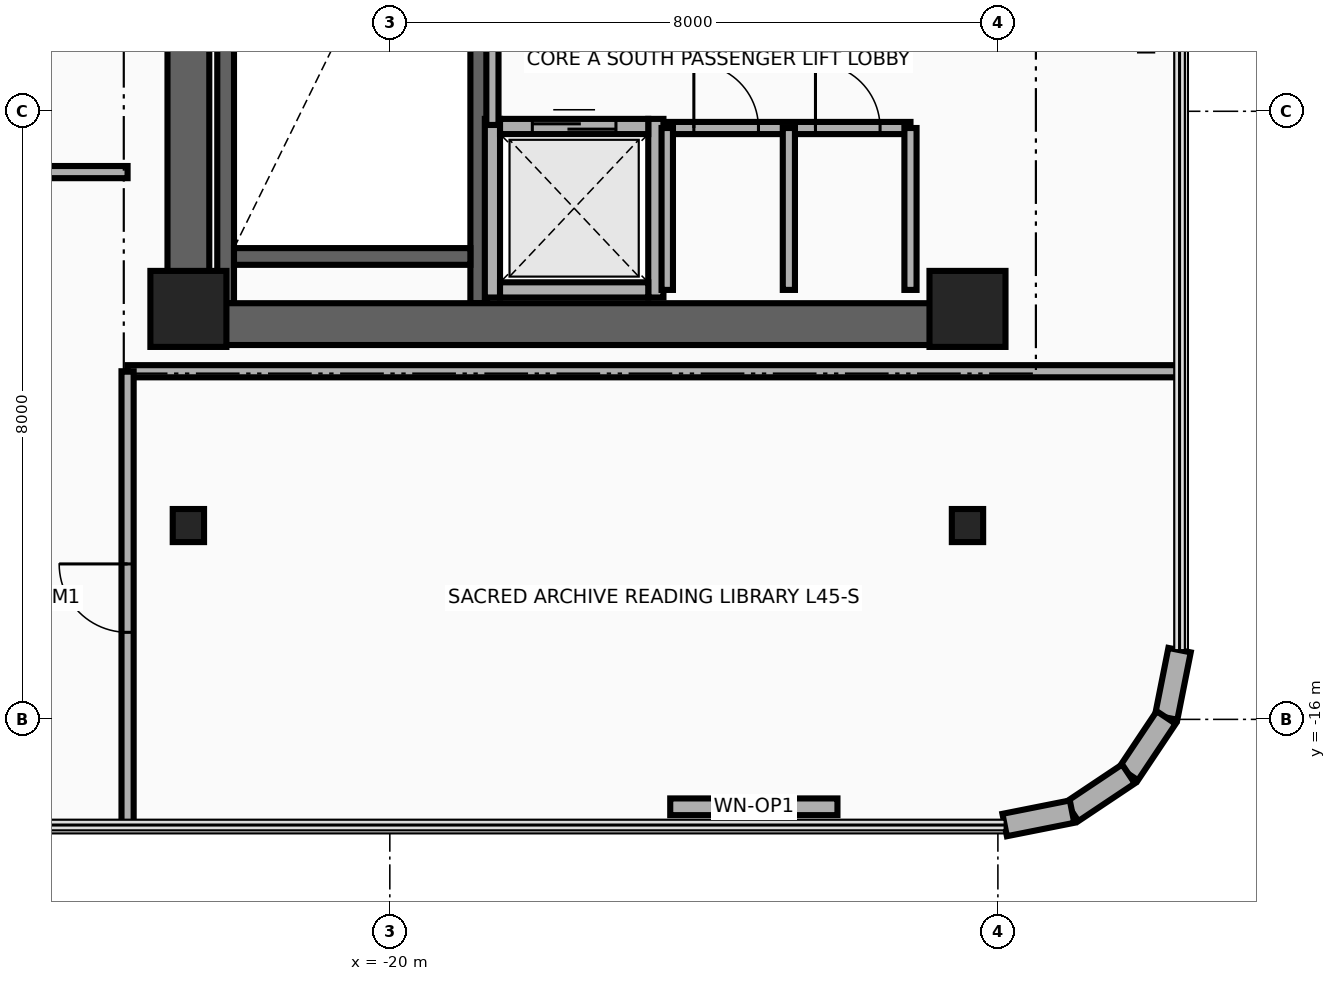
"""IFC4 building model, lengths in metres.
Left out: names, types, materials, properties, quantities, classifications, styles, units other than length and angle.
Written with IfcOpenShell. Run it as: python <this file> out.ifc"""

import sys

from ifc_helpers import new_model, si_unit, direction, frame, frame_2d, origin, origin_2d, place, context, subcontext, project, spatial, rectangle, i_section, extrude, source, transform, mapped, element, fill, save


model = new_model("IFC4")
c1 = context("Model", 3, precision=1e-05, world=origin(), true_north=direction((0.0, 1.0)))
c2 = subcontext(c1, "Body", "Model", "MODEL_VIEW")
j1 = project(units=[si_unit("LENGTHUNIT", "METRE"), si_unit("PLANEANGLEUNIT", "RADIAN")], contexts=[c1])
p1 = place(None, origin())
s1 = spatial("IfcSite", under=j1, at=p1, CompositionType="ELEMENT")
p2 = place(p1, origin())
s2 = spatial("IfcBuilding", under=s1, at=p2, CompositionType="ELEMENT")
p3 = place(p2, frame((0.0, 0.0, 176.55)))
s3 = spatial("IfcBuildingStorey", under=s2, at=p3, CompositionType="ELEMENT", Elevation=176.55)
for number, where, z_axis, x_axis in (
    (1, (-22.16, -10.525, 0.0), (0.0, 0.0, 1.0), (0.0, 1.0, 0.0)),
    (2, (-18.83, -10.525, 0.0), (0.0, 0.0, 1.0), (0.0, 1.0, 0.0)),
):
    element("IfcWall", number, at=place(p3, frame(where, z_axis=z_axis, x_axis=x_axis)), inside=s3, PredefinedType="SHEAR", context=c2, shape_type="SweptSolid", body=[
        extrude(rectangle(XDim=8.745, YDim=0.22, at=frame_2d((4.373, 0.0))), origin(), (0.0, 0.0, 1.0), 3.63),
    ])
p4 = place(p3, frame((-22.05, -9.91, 0.0), z_axis=(0.0, 0.0, 1.0), x_axis=(1.0, 0.0, 0.0)))
e3 = element("IfcWall", 3, at=p4, inside=s3, PredefinedType="SHEAR", context=c2, shape_type="SweptSolid", body=[
    extrude(rectangle(XDim=3.11, YDim=0.22, at=frame_2d((1.555, 0.0))), origin(), (0.0, 0.0, 1.0), 3.63),
])
p5 = place(p3, frame((-22.65, -11.075, 0.0), z_axis=(0.0, 0.0, 1.0), x_axis=(0.0, 1.0, 0.0)))
e4 = element("IfcWall", 4, at=p5, inside=s3, PredefinedType="SHEAR", context=c2, shape_type="SweptSolid", body=[
    extrude(rectangle(XDim=22.15, YDim=0.55, at=frame_2d((11.075, 0.0))), origin(), (0.0, 0.0, 1.0), 3.63),
])
p6 = place(p3, frame((-22.65, -10.8, 0.0), z_axis=(0.0, 0.0, 1.0), x_axis=(1.0, 0.0, 0.0)))
e5 = element("IfcWall", 5, at=p6, inside=s3, PredefinedType="SHEAR", context=c2, shape_type="SweptSolid", body=[
    extrude(rectangle(XDim=10.25, YDim=0.55, at=frame_2d((5.125, 0.0))), origin(), (0.0, 0.0, 1.0), 3.63),
])
m1 = source(origin(), c2, "Body", "SweptSolid", [
    extrude(rectangle(XDim=1.0, YDim=1.0, at=origin_2d()), origin(), (0.0, 0.0, 1.0), 3.95),
])
for number, where, z_axis, x_axis in (
    (6, (-22.65, -10.6, 0.0), (0.0, 0.0, 1.0), (1.0, 0.0, 0.0)),
    (7, (-12.4, -10.6, 0.0), (0.0, 0.0, 1.0), (1.0, 0.0, 0.0)),
):
    element("IfcColumn", number, at=place(p3, frame(where, z_axis=z_axis, x_axis=x_axis)), inside=s3, PredefinedType="COLUMN", context=c2, shape_type="MappedRepresentation", body=[
        mapped(m1, transform((0.0, 0.0, 0.0), x_axis=(1.0, 0.0, 0.0), y_axis=(0.0, 1.0, 0.0), z_axis=(0.0, 0.0, 1.0), scale=1.0)),
    ])
m2 = source(origin(), c2, "Body", "SweptSolid", [
    extrude(i_section(OverallWidth=0.412, OverallDepth=0.435, WebThickness=0.036, FlangeThickness=0.057, at=origin_2d()), origin(), (0.0, 0.0, 1.0), 3.95),
])
for number, where, z_axis, x_axis in (
    (8, (-22.65, -13.45, 0.0), (0.0, 0.0, 1.0), (1.0, 0.0, 0.0)),
    (9, (-12.4, -13.45, 0.0), (0.0, 0.0, 1.0), (1.0, 0.0, 0.0)),
):
    element("IfcColumn", number, at=place(p3, frame(where, z_axis=z_axis, x_axis=x_axis)), inside=s3, PredefinedType="COLUMN", context=c2, shape_type="MappedRepresentation", body=[
        mapped(m2, transform((0.0, 0.0, 0.0), x_axis=(1.0, 0.0, 0.0), y_axis=(0.0, 1.0, 0.0), z_axis=(0.0, 0.0, 1.0), scale=1.0)),
    ])
p7 = place(p3, frame((-9.61, -15.089, 0.0), z_axis=(0.0, 0.0, 1.0), x_axis=(-0.195025152871, -0.980798241101, 0.0)))
e10 = element("IfcWall", 10, at=p7, inside=s3, PredefinedType="SOLIDWALL", context=c2, shape_type="SweptSolid", body=[
    extrude(rectangle(XDim=0.904, YDim=0.3, at=frame_2d((0.452, 0.0))), origin(), (0.0, 0.0, 1.0), 3.63),
])
for number, where, z_axis, x_axis in (
    (11, (-9.786, -15.976, 0.0), (0.0, 0.0, 1.0), (-0.556, -0.832, 0.0)),
    (12, (-10.282, -16.718, 0.0), (0.0, 0.0, 1.0), (-0.832, -0.556, 0.0)),
):
    element("IfcWall", number, at=place(p3, frame(where, z_axis=z_axis, x_axis=x_axis)), inside=s3, PredefinedType="SOLIDWALL", context=c2, shape_type="SweptSolid", body=[
        extrude(rectangle(XDim=0.893, YDim=0.3, at=frame_2d((0.446, 0.0))), origin(), (0.0, 0.0, 1.0), 3.63),
    ])
p8 = place(p3, frame((-11.024, -17.214, 0.0), z_axis=(0.0, 0.0, 1.0), x_axis=(-0.980798241101, -0.195025152871, 0.0)))
e13 = element("IfcWall", 13, at=p8, inside=s3, PredefinedType="SOLIDWALL", context=c2, shape_type="SweptSolid", body=[
    extrude(rectangle(XDim=0.904, YDim=0.3, at=frame_2d((0.452, 0.0))), origin(), (0.0, 0.0, 1.0), 3.63),
])
p9 = place(p3, frame((-14.111, -17.15, 0.0), z_axis=(0.0, 0.0, 1.0), x_axis=(-1.0, 0.0, 0.0)))
e14 = element("IfcWall", 14, at=p9, inside=s3, PredefinedType="SOLIDWALL", context=c2, shape_type="SweptSolid", body=[
    extrude(rectangle(XDim=2.2, YDim=0.22, at=frame_2d((1.1, 0.0))), origin(), (0.0, 0.0, 1.0), 3.63),
])
p10 = place(p9, frame((0.65, 0.0, 0.95)))
e15 = element("IfcOpeningElement", 15, at=p10, cuts=e14, PredefinedType="OPENING", context=c2, shape_type="SweptSolid", body=[
    extrude(rectangle(XDim=0.9, YDim=1.3, at=frame_2d((0.45, 0.65))), frame((0.0, 0.125, 0.0), z_axis=(0.0, -1.0, 0.0), x_axis=(1.0, 0.0, 0.0)), (0.0, 0.0, 1.0), 0.25),
])
for number, where, z_axis, x_axis in (
    (16, (-18.65, -10.45, 0.0), (0.0, 0.0, 1.0), (0.0, 1.0, 0.0)),
    (17, (-16.5, -10.45, 0.0), (0.0, 0.0, 1.0), (0.0, 1.0, 0.0)),
):
    element("IfcWall", number, at=place(p3, frame(where, z_axis=z_axis, x_axis=x_axis)), inside=s3, PredefinedType="MOVABLE", context=c2, shape_type="SweptSolid", body=[
        extrude(rectangle(XDim=2.35, YDim=0.2, at=frame_2d((1.175, 0.0))), origin(), (0.0, 0.0, 1.0), 2.665),
    ])
p11 = place(p3, frame((-18.55, -10.35, 0.0), z_axis=(0.0, 0.0, 1.0), x_axis=(1.0, 0.0, 0.0)))
e18 = element("IfcWall", 18, at=p11, inside=s3, PredefinedType="MOVABLE", context=c2, shape_type="SweptSolid", body=[
    extrude(rectangle(XDim=1.95, YDim=0.2, at=frame_2d((0.975, 0.0))), origin(), (0.0, 0.0, 1.0), 2.665),
])
p12 = place(p3, frame((-18.55, -8.2, 0.0), z_axis=(0.0, 0.0, 1.0), x_axis=(1.0, 0.0, 0.0)))
e19 = element("IfcWall", 19, at=p12, inside=s3, PredefinedType="MOVABLE", context=c2, shape_type="SweptSolid", body=[
    extrude(rectangle(XDim=1.95, YDim=0.2, at=frame_2d((0.975, 0.0))), origin(), (0.0, 0.0, 1.0), 3.63),
])
p13 = place(p12, frame((0.425, 0.0, 0.0)))
e20 = element("IfcOpeningElement", 20, at=p13, cuts=e19, PredefinedType="OPENING", context=c2, shape_type="SweptSolid", body=[
    extrude(rectangle(XDim=1.1, YDim=2.1, at=frame_2d((0.55, 1.05))), frame((0.0, 0.115, 0.0), z_axis=(0.0, -1.0, 0.0), x_axis=(1.0, 0.0, 0.0)), (0.0, 0.0, 1.0), 0.23),
])
p14 = place(p3, frame((-18.65, -8.18, 0.0), z_axis=(0.0, 0.0, 1.0), x_axis=(0.0, 1.0, 0.0)))
e21 = element("IfcWall", 21, at=p14, inside=s3, PredefinedType="PARTITIONING", context=c2, shape_type="SweptSolid", body=[
    extrude(rectangle(XDim=1.56, YDim=0.16, at=frame_2d((0.78, 0.0))), origin(), (0.0, 0.0, 1.0), 3.63),
])
p15 = place(p3, frame((-16.35, -8.22, 0.0), z_axis=(0.0, 0.0, 1.0), x_axis=(1.0, 0.0, 0.0)))
e22 = element("IfcWall", 22, at=p15, inside=s3, PredefinedType="PARTITIONING", context=c2, shape_type="SweptSolid", body=[
    extrude(rectangle(XDim=3.2, YDim=0.16, at=frame_2d((1.6, 0.0))), origin(), (0.0, 0.0, 1.0), 3.63),
])
p16 = place(p15, frame((0.35, 0.0, 0.0)))
e23 = element("IfcOpeningElement", 23, at=p16, cuts=e22, PredefinedType="OPENING", context=c2, shape_type="SweptSolid", body=[
    extrude(rectangle(XDim=0.85, YDim=2.05, at=frame_2d((0.425, 1.025))), frame((0.0, 0.095, 0.0), z_axis=(0.0, -1.0, 0.0), x_axis=(1.0, 0.0, 0.0)), (0.0, 0.0, 1.0), 0.19),
])
p17 = place(p15, frame((1.95, 0.0, 0.0)))
e24 = element("IfcOpeningElement", 24, at=p17, cuts=e22, PredefinedType="OPENING", context=c2, shape_type="SweptSolid", body=[
    extrude(rectangle(XDim=0.85, YDim=2.05, at=frame_2d((0.425, 1.025))), frame((0.0, 0.095, 0.0), z_axis=(0.0, -1.0, 0.0), x_axis=(1.0, 0.0, 0.0)), (0.0, 0.0, 1.0), 0.19),
])
p18 = place(p3, frame((-16.35, -10.35, 0.0), z_axis=(0.0, 0.0, 1.0), x_axis=(0.0, 1.0, 0.0)))
e25 = element("IfcWall", 25, at=p18, inside=s3, PredefinedType="PARTITIONING", context=c2, shape_type="SweptSolid", body=[
    extrude(rectangle(XDim=2.13, YDim=0.15, at=frame_2d((1.065, 0.0))), origin(), (0.0, 0.0, 1.0), 3.63),
])
for number, where, z_axis, x_axis in (
    (26, (-13.15, -10.35, 0.0), (0.0, 0.0, 1.0), (0.0, 1.0, 0.0)),
    (27, (-14.75, -10.35, 0.0), (0.0, 0.0, 1.0), (0.0, 1.0, 0.0)),
):
    element("IfcWall", number, at=place(p3, frame(where, z_axis=z_axis, x_axis=x_axis)), inside=s3, PredefinedType="PARTITIONING", context=c2, shape_type="SweptSolid", body=[
        extrude(rectangle(XDim=2.13, YDim=0.16, at=frame_2d((1.065, 0.0))), origin(), (0.0, 0.0, 1.0), 3.63),
    ])
p19 = place(p3, frame((-23.45, -11.42, 0.0), z_axis=(0.0, 0.0, 1.0), x_axis=(1.0, 0.0, 0.0)))
e28 = element("IfcWall", 28, at=p19, inside=s3, PredefinedType="PARTITIONING", context=c2, shape_type="SweptSolid", body=[
    extrude(rectangle(XDim=13.84, YDim=0.16, at=frame_2d((6.92, 0.0))), origin(), (0.0, 0.0, 1.0), 3.004),
])
p20 = place(p3, frame((-23.45, -17.39, 0.0), z_axis=(0.0, 0.0, 1.0), x_axis=(0.0, 1.0, 0.0)))
e29 = element("IfcWall", 29, at=p20, inside=s3, PredefinedType="PARTITIONING", context=c2, shape_type="SweptSolid", body=[
    extrude(rectangle(XDim=5.97, YDim=0.16, at=frame_2d((2.985, 0.0))), origin(), (0.0, 0.0, 1.0), 3.63),
])
p21 = place(p20, frame((2.535, 0.0, 0.0)))
e30 = element("IfcOpeningElement", 30, at=p21, cuts=e29, PredefinedType="OPENING", context=c2, shape_type="SweptSolid", body=[
    extrude(rectangle(XDim=0.9, YDim=2.1, at=frame_2d((0.45, 1.05))), frame((0.0, 0.095, 0.0), z_axis=(0.0, -1.0, 0.0), x_axis=(1.0, 0.0, 0.0)), (0.0, 0.0, 1.0), 0.19),
])
p22 = place(p3, frame((-30.89, -8.8, 0.0), z_axis=(0.0, 0.0, 1.0), x_axis=(1.0, 0.0, 0.0)))
e31 = element("IfcWall", 31, at=p22, inside=s3, PredefinedType="PARTITIONING", context=c2, shape_type="SweptSolid", body=[
    extrude(rectangle(XDim=7.44, YDim=0.16, at=frame_2d((3.72, 0.0))), origin(), (0.0, 0.0, 1.0), 3.076),
])
p23 = place(p22, frame((3.245, 0.0, 0.0)))
e32 = element("IfcOpeningElement", 32, at=p23, cuts=e31, PredefinedType="OPENING", context=c2, shape_type="SweptSolid", body=[
    extrude(rectangle(XDim=0.95, YDim=2.15, at=frame_2d((0.475, 1.075))), frame((0.0, 0.095, 0.0), z_axis=(0.0, -1.0, 0.0), x_axis=(1.0, 0.0, 0.0)), (0.0, 0.0, 1.0), 0.19),
])
p24 = place(p10, origin())
e33 = element("IfcWindow", 33, at=p24, inside=s3, PartitioningType="SINGLE_PANEL", PredefinedType="WINDOW", context=c2, shape_type="SweptSolid", body=[
    extrude(rectangle(XDim=0.9, YDim=1.3, at=frame_2d((0.45, 0.65))), frame((0.0, 0.03, 0.0), z_axis=(0.0, -1.0, 0.0), x_axis=(1.0, 0.0, 0.0)), (0.0, 0.0, 1.0), 0.06),
])
fill(e15, e33)
p25 = place(p13, origin())
e34 = element("IfcDoor", 34, at=p25, inside=s3, OperationType="DOUBLE_DOOR_SLIDING", PredefinedType="DOOR", context=c2, shape_type="SweptSolid", body=[
    extrude(rectangle(XDim=1.1, YDim=2.1, at=frame_2d((0.55, 1.05))), frame((0.0, 0.025, 0.0), z_axis=(0.0, -1.0, 0.0), x_axis=(1.0, 0.0, 0.0)), (0.0, 0.0, 1.0), 0.05),
])
fill(e20, e34)
p26 = place(p16, origin())
e35 = element("IfcDoor", 35, at=p26, inside=s3, OperationType="SINGLE_SWING_RIGHT", PredefinedType="DOOR", context=c2, shape_type="SweptSolid", body=[
    extrude(rectangle(XDim=0.85, YDim=2.05, at=frame_2d((0.425, 1.025))), frame((0.0, 0.025, 0.0), z_axis=(0.0, -1.0, 0.0), x_axis=(1.0, 0.0, 0.0)), (0.0, 0.0, 1.0), 0.05),
])
fill(e23, e35)
p27 = place(p17, origin())
e36 = element("IfcDoor", 36, at=p27, inside=s3, OperationType="SINGLE_SWING_LEFT", PredefinedType="DOOR", context=c2, shape_type="SweptSolid", body=[
    extrude(rectangle(XDim=0.85, YDim=2.05, at=frame_2d((0.425, 1.025))), frame((0.0, 0.025, 0.0), z_axis=(0.0, -1.0, 0.0), x_axis=(1.0, 0.0, 0.0)), (0.0, 0.0, 1.0), 0.05),
])
fill(e24, e36)
p28 = place(p21, origin())
e37 = element("IfcDoor", 37, at=p28, inside=s3, OperationType="SINGLE_SWING_RIGHT", PredefinedType="DOOR", context=c2, shape_type="SweptSolid", body=[
    extrude(rectangle(XDim=0.9, YDim=2.1, at=frame_2d((0.45, 1.05))), frame((0.0, 0.025, 0.0), z_axis=(0.0, -1.0, 0.0), x_axis=(1.0, 0.0, 0.0)), (0.0, 0.0, 1.0), 0.05),
])
fill(e30, e37)
save(model, sys.argv[1])
